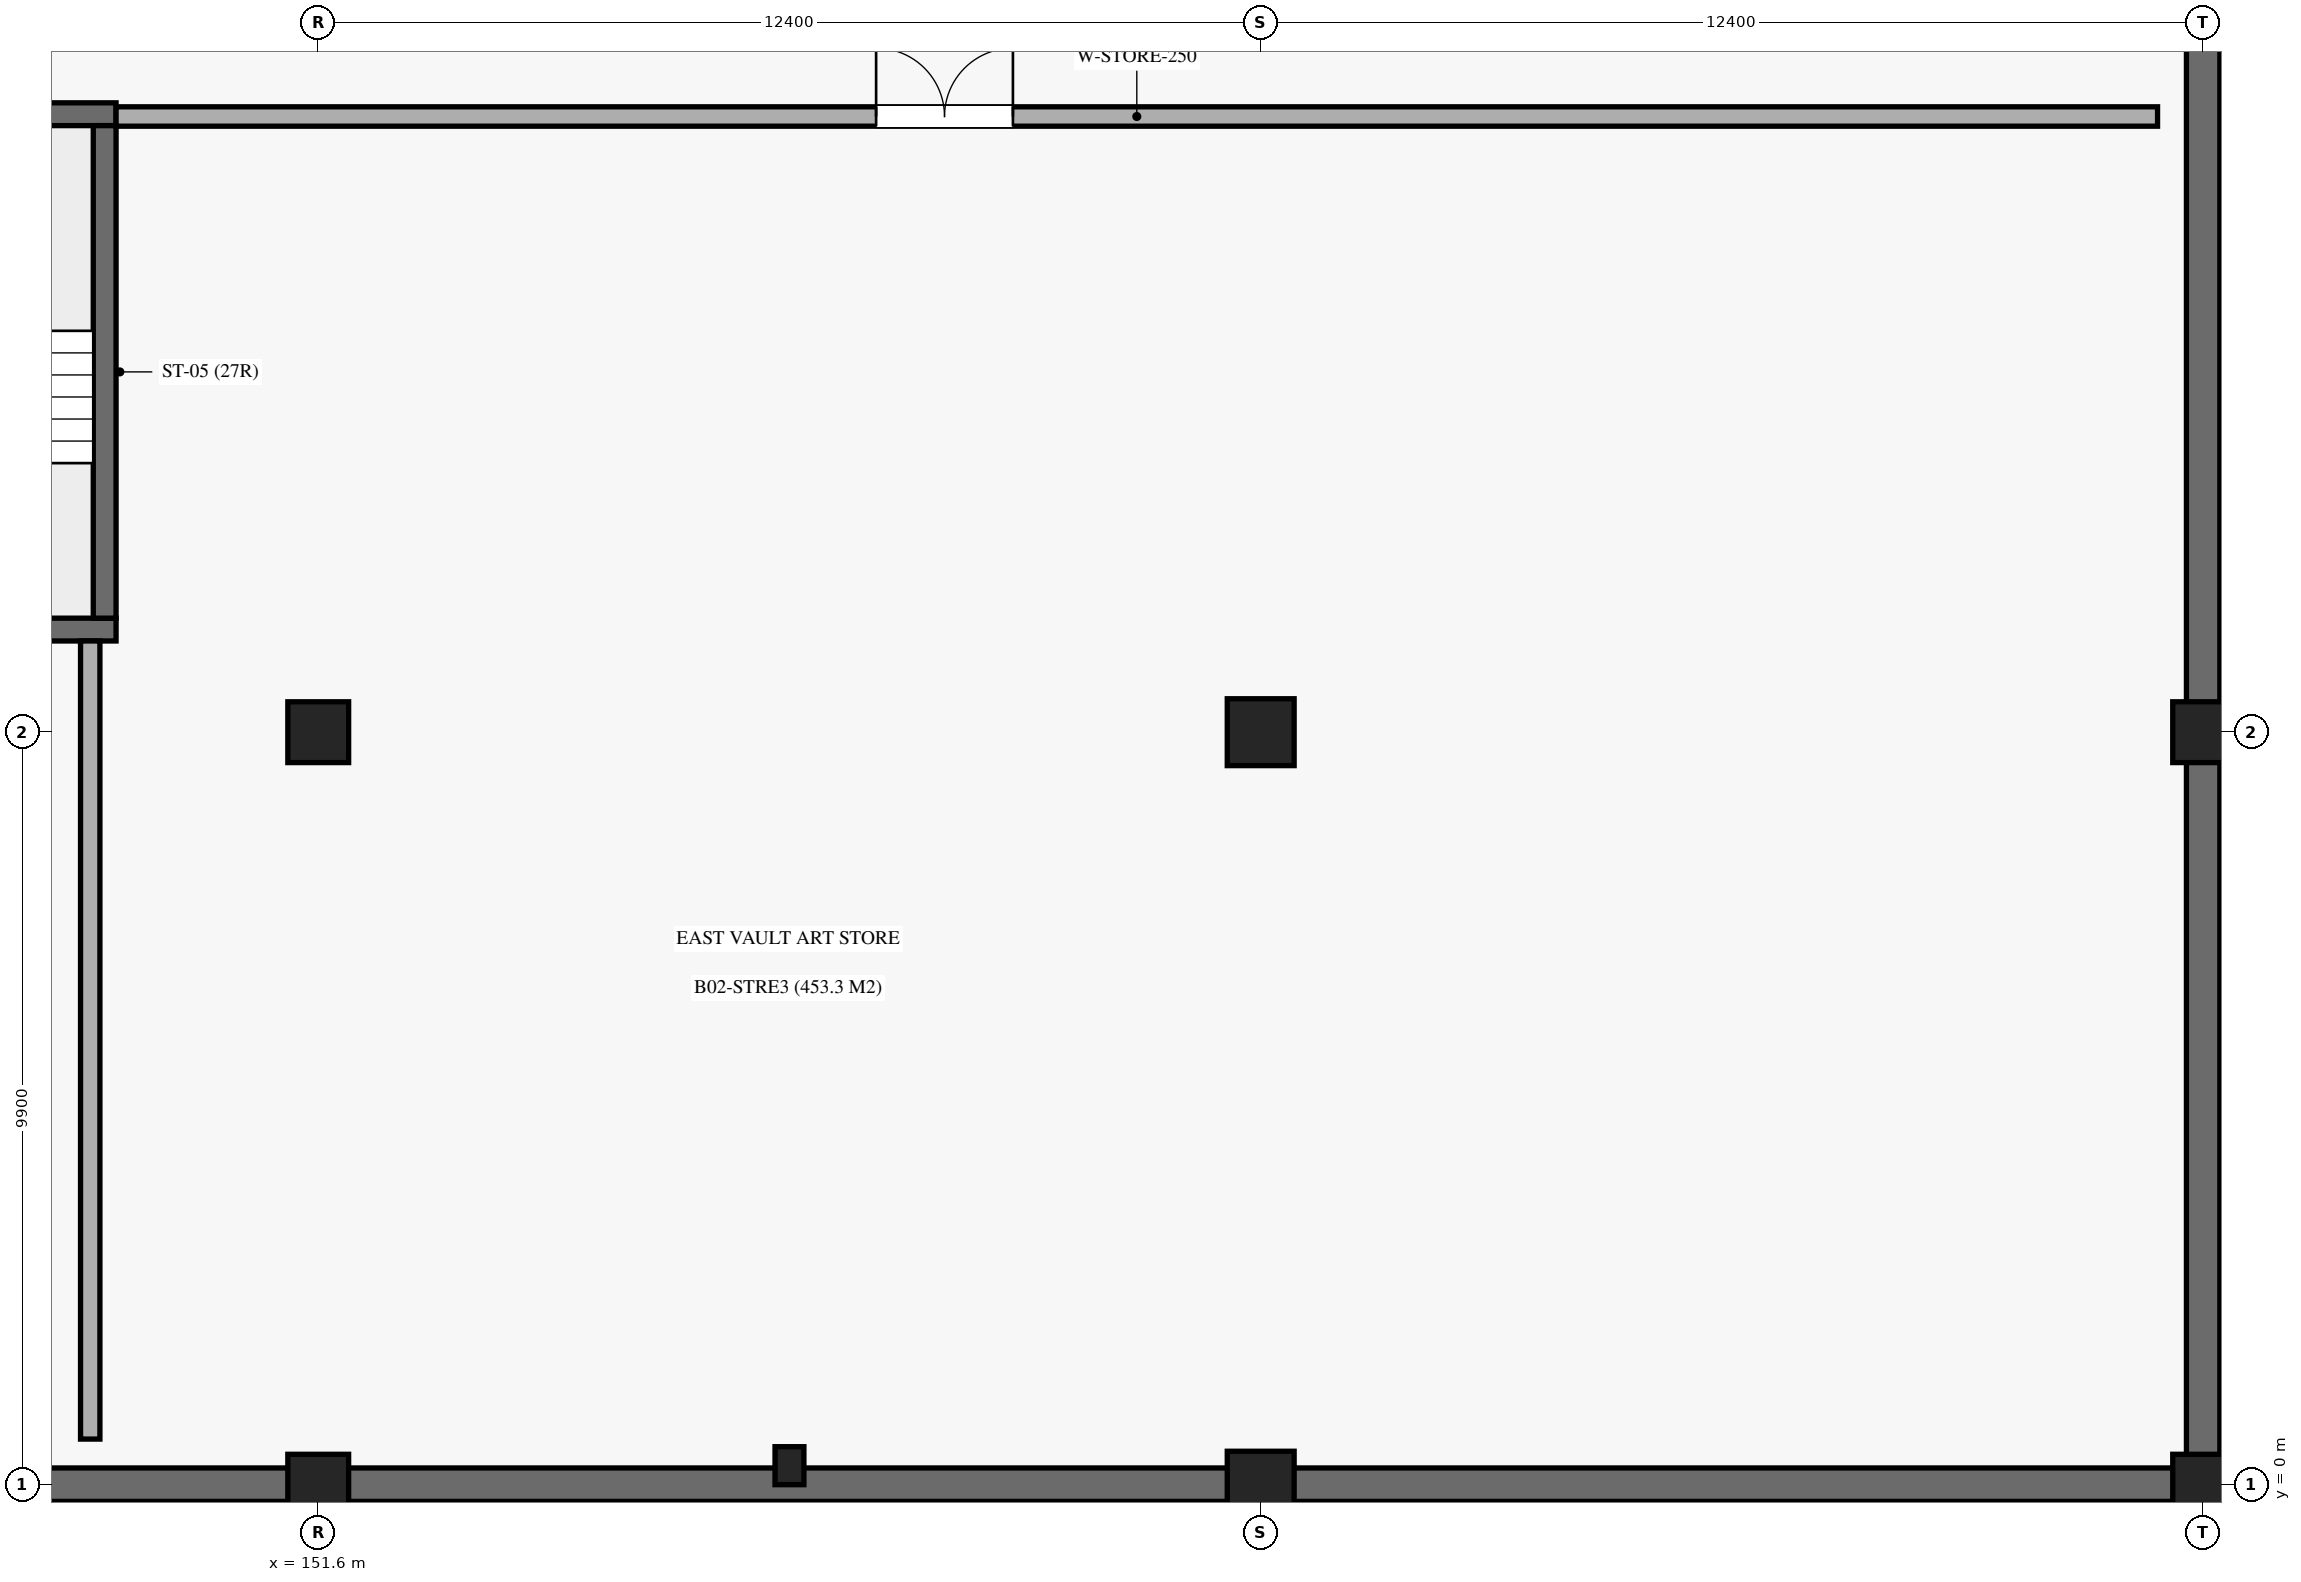
"""IFC4 building model, lengths in metres.
Left out: names, types, materials, properties, quantities, classifications, styles, units other than length and angle.
Written with IfcOpenShell. Run it as: python <this file> out.ifc"""

import sys

from ifc_helpers import new_model, si_unit, direction, frame, frame_2d, origin, origin_2d, place, context, subcontext, project, spatial, rectangle, circle, extrude, element, fill, save


model = new_model("IFC4")
c1 = context("Model", 3, precision=1e-05, world=origin(), true_north=direction((0.0, 1.0)))
c2 = subcontext(c1, "Body", "Model", "MODEL_VIEW")
j1 = project(units=[si_unit("LENGTHUNIT", "METRE"), si_unit("PLANEANGLEUNIT", "RADIAN")], contexts=[c1])
p1 = place(None, origin())
s1 = spatial("IfcSite", under=j1, at=p1, CompositionType="ELEMENT")
p2 = place(p1, origin())
s2 = spatial("IfcBuilding", under=s1, at=p2, CompositionType="ELEMENT")
p3 = place(p2, frame((0.0, 0.0, -9.18)))
s3 = spatial("IfcBuildingStorey", under=s2, at=p3, CompositionType="ELEMENT", Elevation=-9.18)
for number, where, z_axis, x_axis in (
    (1, (151.6, 0.0, 0.0), (0.0, 0.0, 1.0), (1.0, 0.0, 0.0)),
    (2, (151.6, 9.9, 0.0), (0.0, 0.0, 1.0), (1.0, 0.0, 0.0)),
):
    element("IfcColumn", number, at=place(p3, frame(where, z_axis=z_axis, x_axis=x_axis)), inside=s3, PredefinedType="COLUMN", context=c2, shape_type="SweptSolid", body=[
        extrude(rectangle(XDim=0.8, YDim=0.8, at=origin_2d()), origin(), (0.0, 0.0, 1.0), 4.59),
    ])
for number, where, z_axis, x_axis in (
    (3, (164.0, 0.0, 0.0), (0.0, 0.0, 1.0), (1.0, 0.0, 0.0)),
    (4, (164.0, 9.9, 0.0), (0.0, 0.0, 1.0), (1.0, 0.0, 0.0)),
):
    element("IfcColumn", number, at=place(p3, frame(where, z_axis=z_axis, x_axis=x_axis)), inside=s3, PredefinedType="COLUMN", context=c2, shape_type="SweptSolid", body=[
        extrude(circle(Radius=0.44, at=origin_2d()), origin(), (0.0, 0.0, 1.0), 4.59),
    ])
for number, where, z_axis, x_axis in (
    (5, (176.4, 0.0, 0.0), (0.0, 0.0, 1.0), (1.0, 0.0, 0.0)),
    (6, (176.4, 9.9, 0.0), (0.0, 0.0, 1.0), (1.0, 0.0, 0.0)),
):
    element("IfcColumn", number, at=place(p3, frame(where, z_axis=z_axis, x_axis=x_axis)), inside=s3, PredefinedType="COLUMN", context=c2, shape_type="SweptSolid", body=[
        extrude(rectangle(XDim=0.8, YDim=0.8, at=origin_2d()), origin(), (0.0, 0.0, 1.0), 4.59),
    ])
p4 = place(p3, frame((157.8, 0.25, 0.0), z_axis=(0.0, 0.0, 1.0), x_axis=(1.0, 0.0, 0.0)))
e7 = element("IfcColumn", 7, at=p4, inside=s3, PredefinedType="PILASTER", context=c2, shape_type="SweptSolid", body=[
    extrude(rectangle(XDim=0.38, YDim=0.5, at=origin_2d()), origin(), (0.0, 0.0, 1.0), 4.59),
])
p5 = place(p3, frame((62.0, 0.0, 0.0), z_axis=(0.0, 0.0, 1.0), x_axis=(1.0, 0.0, 0.0)))
e8 = element("IfcWall", 8, at=p5, inside=s3, PredefinedType="USERDEFINED", context=c2, shape_type="SweptSolid", body=[
    extrude(rectangle(XDim=114.4, YDim=0.44, at=frame_2d((57.2, 0.0))), origin(), (0.0, 0.0, 1.0), 3.66),
])
p6 = place(p3, frame((176.4, 0.0, 0.0), z_axis=(0.0, 0.0, 1.0), x_axis=(0.0, 1.0, 0.0)))
e9 = element("IfcWall", 9, at=p6, inside=s3, PredefinedType="USERDEFINED", context=c2, shape_type="SweptSolid", body=[
    extrude(rectangle(XDim=39.6, YDim=0.44, at=frame_2d((19.8, 0.0))), origin(), (0.0, 0.0, 1.0), 3.66),
])
for number, where, z_axis, x_axis in (
    (10, (141.86, 11.25, 0.0), (0.0, 0.0, 1.0), (1.0, 0.0, 0.0)),
    (11, (141.86, 18.03, 0.0), (0.0, 0.0, 1.0), (1.0, 0.0, 0.0)),
):
    element("IfcWall", number, at=place(p3, frame(where, z_axis=z_axis, x_axis=x_axis)), inside=s3, PredefinedType="SHEAR", context=c2, shape_type="SweptSolid", body=[
        extrude(rectangle(XDim=7.08, YDim=0.3, at=frame_2d((3.54, 0.0))), origin(), (0.0, 0.0, 1.0), 4.31),
    ])
p7 = place(p3, frame((148.79, 11.4, 0.0), z_axis=(0.0, 0.0, 1.0), x_axis=(0.0, 1.0, 0.0)))
e12 = element("IfcWall", 12, at=p7, inside=s3, PredefinedType="SHEAR", context=c2, shape_type="SweptSolid", body=[
    extrude(rectangle(XDim=6.48, YDim=0.3, at=frame_2d((3.24, 0.0))), origin(), (0.0, 0.0, 1.0), 4.31),
])
p8 = place(p3, frame((148.94, 18.0, 0.0), z_axis=(0.0, 0.0, 1.0), x_axis=(1.0, 0.0, 0.0)))
e13 = element("IfcWall", 13, at=p8, inside=s3, PredefinedType="SOLIDWALL", context=c2, shape_type="SweptSolid", body=[
    extrude(rectangle(XDim=26.86, YDim=0.255, at=frame_2d((13.43, 0.0))), origin(), (0.0, 0.0, 1.0), 3.43),
])
p9 = place(p8, frame((10.0, 0.0, 0.0)))
e14 = element("IfcOpeningElement", 14, at=p9, cuts=e13, PredefinedType="OPENING", context=c2, shape_type="SweptSolid", body=[
    extrude(rectangle(XDim=1.8, YDim=2.35, at=frame_2d((0.9, 1.175))), frame((0.0, 0.137, 0.0), z_axis=(0.0, -1.0, 0.0), x_axis=(1.0, 0.0, 0.0)), (0.0, 0.0, 1.0), 0.275),
])
p10 = place(p3, frame((148.6, 0.6, 0.0), z_axis=(0.0, 0.0, 1.0), x_axis=(0.0, 1.0, 0.0)))
e15 = element("IfcWall", 15, at=p10, inside=s3, PredefinedType="SOLIDWALL", context=c2, shape_type="SweptSolid", body=[
    extrude(rectangle(XDim=10.5, YDim=0.255, at=frame_2d((5.25, 0.0))), origin(), (0.0, 0.0, 1.0), 3.43),
])
p11 = place(p9, origin())
e16 = element("IfcDoor", 16, at=p11, inside=s3, OperationType="DOUBLE_DOOR_SINGLE_SWING", PredefinedType="DOOR", context=c2, shape_type="SweptSolid", body=[
    extrude(rectangle(XDim=1.8, YDim=2.35, at=frame_2d((0.9, 1.175))), frame((0.0, 0.025, 0.0), z_axis=(0.0, -1.0, 0.0), x_axis=(1.0, 0.0, 0.0)), (0.0, 0.0, 1.0), 0.05),
])
fill(e14, e16)
save(model, sys.argv[1])
